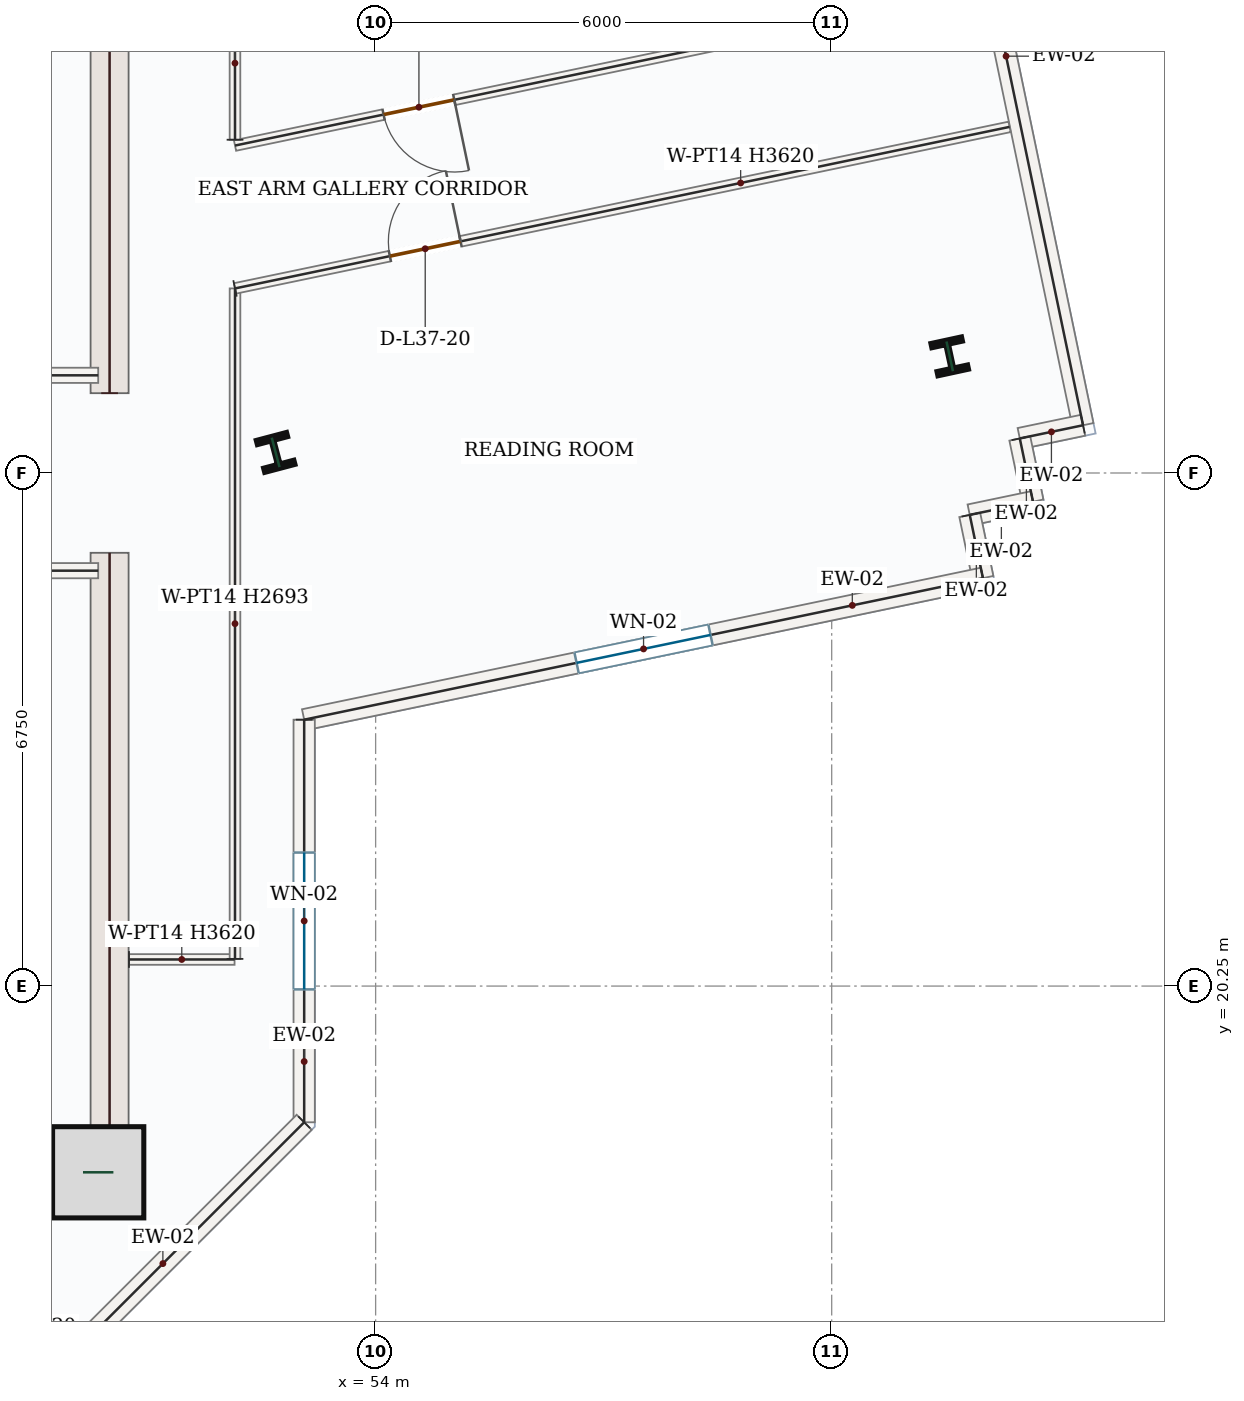
"""IFC4 building model, lengths in metres.
Left out: names, types, materials, properties, quantities, classifications, styles, units other than length and angle.
Written with IfcOpenShell. Run it as: python <this file> out.ifc"""

import sys

from ifc_helpers import new_model, si_unit, direction, frame, frame_2d, origin, origin_2d, place, context, subcontext, project, spatial, rectangle, i_section, extrude, source, transform, mapped, element, fill, save


model = new_model("IFC4")
c1 = context("Model", 3, precision=1e-05, world=origin(), true_north=direction((0.0, 1.0)))
c2 = subcontext(c1, "Body", "Model", "MODEL_VIEW")
j1 = project(units=[si_unit("LENGTHUNIT", "METRE"), si_unit("PLANEANGLEUNIT", "RADIAN")], contexts=[c1])
p1 = place(None, origin())
s1 = spatial("IfcSite", under=j1, at=p1, CompositionType="ELEMENT")
p2 = place(p1, origin())
s2 = spatial("IfcBuilding", under=s1, at=p2, CompositionType="ELEMENT")
p3 = place(p2, frame((0.0, 0.0, 162.9)))
s3 = spatial("IfcBuildingStorey", under=s2, at=p3, CompositionType="ELEMENT", Elevation=162.9)
m1 = source(origin(), c2, "Body", "SweptSolid", [
    extrude(rectangle(XDim=8.55, YDim=0.5, at=frame_2d((4.275, 0.0))), origin(), (0.0, 0.0, 1.0), 3.62),
])
for number, where, z_axis, x_axis in (
    (1, (50.5, 17.4, 0.0), (0.0, 0.0, 1.0), (0.0, 1.0, 0.0)),
    (2, (50.5, 28.05, 0.0), (0.0, 0.0, 1.0), (0.0, 1.0, 0.0)),
):
    element("IfcWall", number, at=place(p3, frame(where, z_axis=z_axis, x_axis=x_axis)), inside=s3, PredefinedType="SHEAR", context=c2, shape_type="MappedRepresentation", body=[
        mapped(m1, transform((0.0, 0.0, 0.0), x_axis=(1.0, 0.0, 0.0), y_axis=(0.0, 1.0, 0.0), z_axis=(0.0, 0.0, 1.0), scale=1.0)),
    ])
m2 = source(origin(), c2, "Body", "SweptSolid", [
    extrude(rectangle(XDim=7.0, YDim=0.5, at=frame_2d((3.5, 0.0))), origin(), (0.0, 0.0, 1.0), 3.62),
])
p4 = place(p3, frame((43.25, 17.65, 0.0), z_axis=(0.0, 0.0, 1.0), x_axis=(1.0, 0.0, 0.0)))
e3 = element("IfcWall", 3, at=p4, inside=s3, PredefinedType="SHEAR", context=c2, shape_type="MappedRepresentation", body=[
    mapped(m2, transform((0.0, 0.0, 0.0), x_axis=(1.0, 0.0, 0.0), y_axis=(0.0, 1.0, 0.0), z_axis=(0.0, 0.0, 1.0), scale=1.0)),
])
m3 = source(origin(), c2, "Body", "SweptSolid", [
    extrude(rectangle(XDim=1.2, YDim=1.2, at=origin_2d()), origin(), (0.0, 0.0, 1.0), 3.9),
])
p5 = place(p3, frame((50.35, 17.8, 0.0), z_axis=(0.0, 0.0, 1.0), x_axis=(1.0, 0.0, 0.0)))
e4 = element("IfcColumn", 4, at=p5, inside=s3, PredefinedType="COLUMN", context=c2, shape_type="MappedRepresentation", body=[
    mapped(m3, transform((0.0, 0.0, 0.0), x_axis=(1.0, 0.0, 0.0), y_axis=(0.0, 1.0, 0.0), z_axis=(0.0, 0.0, 1.0), scale=1.0)),
])
m4 = source(origin(), c2, "Body", "SweptSolid", [
    extrude(i_section(OverallWidth=0.412, OverallDepth=0.435, WebThickness=0.036, FlangeThickness=0.057, FilletRadius=0.018, at=origin_2d()), origin(), (0.0, 0.0, 1.0), 3.9),
])
for number, where, z_axis, x_axis in (
    (5, (52.684, 27.271, 0.0), (0.0, 0.0, 1.0), (0.967, 0.255, 0.0)),
    (6, (61.553, 28.535, 0.0), (0.0, 0.0, 1.0), (0.977, 0.211, 0.0)),
):
    element("IfcColumn", number, at=place(p3, frame(where, z_axis=z_axis, x_axis=x_axis)), inside=s3, PredefinedType="COLUMN", context=c2, shape_type="MappedRepresentation", body=[
        mapped(m4, transform((0.0, 0.0, 0.0), x_axis=(1.0, 0.0, 0.0), y_axis=(0.0, 1.0, 0.0), z_axis=(0.0, 0.0, 1.0), scale=1.0)),
    ])
m5 = source(origin(), c2, "Body", "SweptSolid", [
    extrude(rectangle(XDim=9.92, YDim=0.28, at=frame_2d((4.96, 0.0))), origin(), (0.0, 0.0, 1.0), 3.62),
])
p6 = place(p3, frame((61.282, 37.339, 0.0), z_axis=(0.0, 0.0, 1.0), x_axis=(0.204150812873, -0.978939449406, 0.0)))
e7 = element("IfcWall", 7, at=p6, inside=s3, PredefinedType="SOLIDWALL", context=c2, shape_type="MappedRepresentation", body=[
    mapped(m5, transform((0.0, 0.0, 0.0), x_axis=(1.0, 0.0, 0.0), y_axis=(0.0, 1.0, 0.0), z_axis=(0.0, 0.0, 1.0), scale=1.0)),
])
m6 = source(origin(), c2, "Body", "SweptSolid", [
    extrude(rectangle(XDim=0.85, YDim=0.28, at=frame_2d((0.425, 0.0))), origin(), (0.0, 0.0, 1.0), 3.62),
])
for number, where, z_axis, x_axis in (
    (8, (63.307, 27.628, 0.0), (0.0, 0.0, 1.0), (-0.979, -0.204, 0.0)),
    (9, (62.475, 27.455, 0.0), (0.0, 0.0, 1.0), (0.204, -0.979, 0.0)),
    (10, (62.648, 26.623, 0.0), (0.0, 0.0, 1.0), (-0.979, -0.204, 0.0)),
):
    element("IfcWall", number, at=place(p3, frame(where, z_axis=z_axis, x_axis=x_axis)), inside=s3, PredefinedType="SOLIDWALL", context=c2, shape_type="MappedRepresentation", body=[
        mapped(m6, transform((0.0, 0.0, 0.0), x_axis=(1.0, 0.0, 0.0), y_axis=(0.0, 1.0, 0.0), z_axis=(0.0, 0.0, 1.0), scale=1.0)),
    ])
m7 = source(origin(), c2, "Body", "SweptSolid", [
    extrude(rectangle(XDim=0.85, YDim=0.28, at=frame_2d((0.425, 0.0))), origin(), (0.0, 0.0, 1.0), 3.62),
])
p7 = place(p3, frame((61.816, 26.449, 0.0), z_axis=(0.0, 0.0, 1.0), x_axis=(0.203896913579, -0.97899236393, 0.0)))
e11 = element("IfcWall", 11, at=p7, inside=s3, PredefinedType="SOLIDWALL", context=c2, shape_type="MappedRepresentation", body=[
    mapped(m7, transform((0.0, 0.0, 0.0), x_axis=(1.0, 0.0, 0.0), y_axis=(0.0, 1.0, 0.0), z_axis=(0.0, 0.0, 1.0), scale=1.0)),
])
p8 = place(p3, frame((61.99, 25.617, 0.0), z_axis=(0.0, 0.0, 1.0), x_axis=(-0.978937646314, -0.204159458828, 0.0)))
e12 = element("IfcWall", 12, at=p8, inside=s3, PredefinedType="SOLIDWALL", context=c2, shape_type="SweptSolid", body=[
    extrude(rectangle(XDim=9.122, YDim=0.28, at=frame_2d((4.561, 0.0))), origin(), (0.0, 0.0, 1.0), 3.62),
])
p9 = place(p8, frame((3.661, 0.0, 0.85)))
e13 = element("IfcOpeningElement", 13, at=p9, cuts=e12, PredefinedType="OPENING", context=c2, shape_type="SweptSolid", body=[
    extrude(rectangle(XDim=1.8, YDim=1.75, at=frame_2d((0.9, 0.875))), frame((0.0, 0.15, 0.0), z_axis=(0.0, -1.0, 0.0), x_axis=(1.0, 0.0, 0.0)), (0.0, 0.0, 1.0), 0.3),
])
p10 = place(p3, frame((53.06, 23.754, 0.0), z_axis=(0.0, 0.0, 1.0), x_axis=(0.0, -1.0, 0.0)))
e14 = element("IfcWall", 14, at=p10, inside=s3, PredefinedType="SOLIDWALL", context=c2, shape_type="SweptSolid", body=[
    extrude(rectangle(XDim=5.296, YDim=0.28, at=frame_2d((2.648, 0.0))), origin(), (0.0, 0.0, 1.0), 3.62),
])
p11 = place(p10, frame((1.748, 0.0, 0.85)))
e15 = element("IfcOpeningElement", 15, at=p11, cuts=e14, PredefinedType="OPENING", context=c2, shape_type="SweptSolid", body=[
    extrude(rectangle(XDim=1.8, YDim=1.75, at=frame_2d((0.9, 0.875))), frame((0.0, 0.15, 0.0), z_axis=(0.0, -1.0, 0.0), x_axis=(1.0, 0.0, 0.0)), (0.0, 0.0, 1.0), 0.3),
])
m8 = source(origin(), c2, "Body", "SweptSolid", [
    extrude(rectangle(XDim=5.258, YDim=0.28, at=frame_2d((2.629, 0.0))), origin(), (0.0, 0.0, 1.0), 3.62),
])
p12 = place(p3, frame((53.06, 18.458, 0.0), z_axis=(0.0, 0.0, 1.0), x_axis=(-0.707106781187, -0.707106781187, 0.0)))
e16 = element("IfcWall", 16, at=p12, inside=s3, PredefinedType="SOLIDWALL", context=c2, shape_type="MappedRepresentation", body=[
    mapped(m8, transform((0.0, 0.0, 0.0), x_axis=(1.0, 0.0, 0.0), y_axis=(0.0, 1.0, 0.0), z_axis=(0.0, 0.0, 1.0), scale=1.0)),
])
m9 = source(origin(), c2, "Body", "SweptSolid", [
    extrude(rectangle(XDim=4.25, YDim=0.2, at=frame_2d((2.125, 0.0))), origin(), (0.0, 0.0, 1.0), 3.62),
])
for number, where, z_axis, x_axis in (
    (17, (46.1, 25.715, 0.0), (0.0, 0.0, 1.0), (1.0, 0.0, 0.0)),
    (18, (46.1, 28.285, 0.0), (0.0, 0.0, 1.0), (1.0, 0.0, 0.0)),
):
    element("IfcWall", number, at=place(p3, frame(where, z_axis=z_axis, x_axis=x_axis)), inside=s3, PredefinedType="SOLIDWALL", context=c2, shape_type="MappedRepresentation", body=[
        mapped(m9, transform((0.0, 0.0, 0.0), x_axis=(1.0, 0.0, 0.0), y_axis=(0.0, 1.0, 0.0), z_axis=(0.0, 0.0, 1.0), scale=1.0)),
    ])
m10 = source(origin(), c2, "Body", "SweptSolid", [
    extrude(rectangle(XDim=1.389, YDim=0.14, at=frame_2d((0.695, 0.0))), origin(), (0.0, 0.0, 1.0), 3.62),
])
p13 = place(p3, frame((50.755, 20.6, 0.0), z_axis=(0.0, 0.0, 1.0), x_axis=(1.0, 0.0, 0.0)))
e19 = element("IfcWall", 19, at=p13, inside=s3, PredefinedType="PARTITIONING", context=c2, shape_type="MappedRepresentation", body=[
    mapped(m10, transform((0.0, 0.0, 0.0), x_axis=(1.0, 0.0, 0.0), y_axis=(0.0, 1.0, 0.0), z_axis=(0.0, 0.0, 1.0), scale=1.0)),
])
m11 = source(origin(), c2, "Body", "SweptSolid", [
    extrude(rectangle(XDim=8.821, YDim=0.14, at=frame_2d((4.41, 0.0))), origin(), (0.0, 0.0, 1.0), 2.693),
])
p14 = place(p3, frame((52.15, 20.608, 0.0), z_axis=(0.0, 0.0, 1.0), x_axis=(2.7678596e-05, 0.999999999617, 0.0)))
e20 = element("IfcWall", 20, at=p14, inside=s3, PredefinedType="PARTITIONING", context=c2, shape_type="MappedRepresentation", body=[
    mapped(m11, transform((0.0, 0.0, 0.0), x_axis=(1.0, 0.0, 0.0), y_axis=(0.0, 1.0, 0.0), z_axis=(0.0, 0.0, 1.0), scale=1.0)),
])
p15 = place(p3, frame((52.15, 29.428, 0.0), z_axis=(0.0, 0.0, 1.0), x_axis=(0.978935516763, 0.204169669688, 0.0)))
e21 = element("IfcWall", 21, at=p15, inside=s3, PredefinedType="PARTITIONING", context=c2, shape_type="SweptSolid", body=[
    extrude(rectangle(XDim=10.409, YDim=0.14, at=frame_2d((5.205, 0.0))), origin(), (0.0, 0.0, 1.0), 3.62),
])
p16 = place(p15, frame((2.081, 0.0, 0.0)))
e22 = element("IfcOpeningElement", 22, at=p16, cuts=e21, PredefinedType="OPENING", context=c2, shape_type="SweptSolid", body=[
    extrude(rectangle(XDim=0.95, YDim=2.15, at=frame_2d((0.475, 1.075))), frame((0.0, 0.08, 0.0), z_axis=(0.0, -1.0, 0.0), x_axis=(1.0, 0.0, 0.0)), (0.0, 0.0, 1.0), 0.16),
])
p17 = place(p3, frame((61.965, 33.354, 0.0), z_axis=(0.0, 0.0, 1.0), x_axis=(-0.978942518705, -0.204136094483, 0.0)))
e23 = element("IfcWall", 23, at=p17, inside=s3, PredefinedType="PARTITIONING", context=c2, shape_type="SweptSolid", body=[
    extrude(rectangle(XDim=10.026, YDim=0.14, at=frame_2d((5.013, 0.0))), origin(), (0.0, 0.0, 1.0), 3.62),
])
p18 = place(p17, frame((7.079, 0.0, 0.0)))
e24 = element("IfcOpeningElement", 24, at=p18, cuts=e23, PredefinedType="OPENING", context=c2, shape_type="SweptSolid", body=[
    extrude(rectangle(XDim=0.95, YDim=2.15, at=frame_2d((0.475, 1.075))), frame((0.0, 0.08, 0.0), z_axis=(0.0, -1.0, 0.0), x_axis=(1.0, 0.0, 0.0)), (0.0, 0.0, 1.0), 0.16),
])
m12 = source(origin(), c2, "Body", "SweptSolid", [
    extrude(rectangle(XDim=2.014, YDim=0.14, at=frame_2d((1.007, 0.0))), origin(), (0.0, 0.0, 1.0), 3.079),
])
p19 = place(p3, frame((52.15, 31.385, 0.0), z_axis=(0.0, 0.0, 1.0), x_axis=(-0.000484789665, 0.999999882489, 0.0)))
e25 = element("IfcWall", 25, at=p19, inside=s3, PredefinedType="PARTITIONING", context=c2, shape_type="MappedRepresentation", body=[
    mapped(m12, transform((0.0, 0.0, 0.0), x_axis=(1.0, 0.0, 0.0), y_axis=(0.0, 1.0, 0.0), z_axis=(0.0, 0.0, 1.0), scale=1.0)),
])
m13 = source(origin(), c2, "Body", "SweptSolid", [
    extrude(rectangle(XDim=1.8, YDim=1.75, at=frame_2d((0.9, 0.875))), frame((0.0, 0.03, 0.0), z_axis=(0.0, -1.0, 0.0), x_axis=(1.0, 0.0, 0.0)), (0.0, 0.0, 1.0), 0.06),
])
p20 = place(p9, origin())
e26 = element("IfcWindow", 26, at=p20, inside=s3, PartitioningType="DOUBLE_PANEL_VERTICAL", PredefinedType="WINDOW", context=c2, shape_type="MappedRepresentation", body=[
    mapped(m13, transform((0.0, 0.0, 0.0), x_axis=(1.0, 0.0, 0.0), y_axis=(0.0, 1.0, 0.0), z_axis=(0.0, 0.0, 1.0), scale=1.0)),
])
fill(e13, e26)
p21 = place(p11, origin())
e27 = element("IfcWindow", 27, at=p21, inside=s3, PartitioningType="DOUBLE_PANEL_VERTICAL", PredefinedType="WINDOW", context=c2, shape_type="MappedRepresentation", body=[
    mapped(m13, transform((0.0, 0.0, 0.0), x_axis=(1.0, 0.0, 0.0), y_axis=(0.0, 1.0, 0.0), z_axis=(0.0, 0.0, 1.0), scale=1.0)),
])
fill(e15, e27)
m14 = source(origin(), c2, "Body", "SweptSolid", [
    extrude(rectangle(XDim=0.95, YDim=2.15, at=frame_2d((0.475, 1.075))), frame((0.0, 0.025, 0.0), z_axis=(0.0, -1.0, 0.0), x_axis=(1.0, 0.0, 0.0)), (0.0, 0.0, 1.0), 0.05),
])
p22 = place(p16, origin())
e28 = element("IfcDoor", 28, at=p22, inside=s3, OperationType="SINGLE_SWING_RIGHT", PredefinedType="DOOR", context=c2, shape_type="MappedRepresentation", body=[
    mapped(m14, transform((0.0, 0.0, 0.0), x_axis=(1.0, 0.0, 0.0), y_axis=(0.0, 1.0, 0.0), z_axis=(0.0, 0.0, 1.0), scale=1.0)),
])
fill(e22, e28)
p23 = place(p18, origin())
e29 = element("IfcDoor", 29, at=p23, inside=s3, OperationType="SINGLE_SWING_LEFT", PredefinedType="DOOR", context=c2, shape_type="MappedRepresentation", body=[
    mapped(m14, transform((0.0, 0.0, 0.0), x_axis=(1.0, 0.0, 0.0), y_axis=(0.0, 1.0, 0.0), z_axis=(0.0, 0.0, 1.0), scale=1.0)),
])
fill(e24, e29)
save(model, sys.argv[1])
